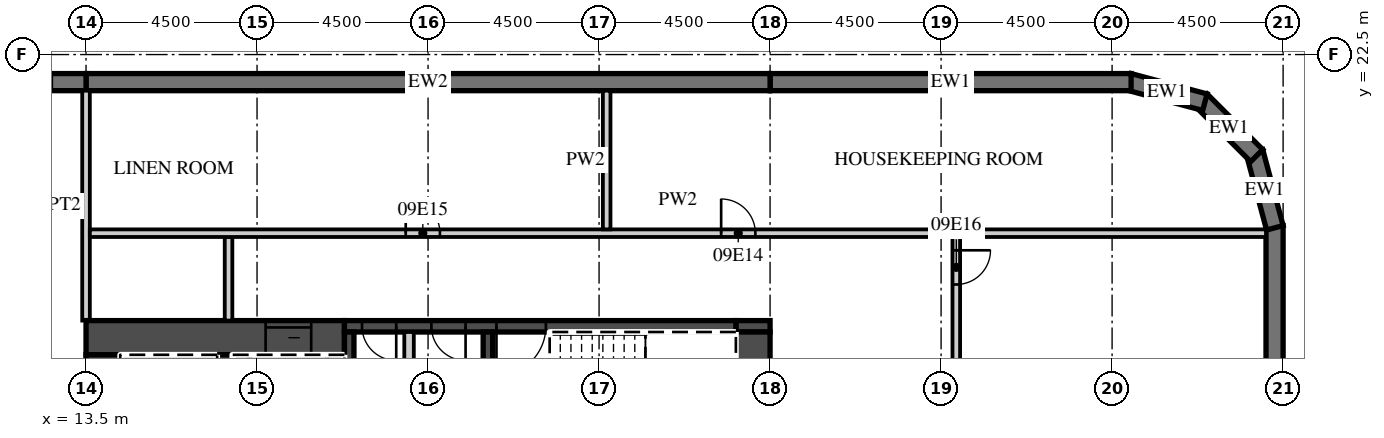
"""IFC4 building model, lengths in metres.
Left out: names, types, materials, properties, quantities, classifications, styles, units other than length and angle.
Written with IfcOpenShell. Run it as: python <this file> out.ifc"""

import sys

from ifc_helpers import new_model, si_unit, direction, frame, frame_2d, origin, place, context, subcontext, project, spatial, polyline, rectangle, outline, extrude, element, fill, save


model = new_model("IFC4")
c1 = context("Model", 3, precision=1e-05, world=origin(), true_north=direction((0.0, 1.0)))
c2 = subcontext(c1, "Body", "Model", "MODEL_VIEW")
j1 = project(units=[si_unit("LENGTHUNIT", "METRE"), si_unit("PLANEANGLEUNIT", "RADIAN")], contexts=[c1])
p1 = place(None, origin())
s1 = spatial("IfcSite", under=j1, at=p1, CompositionType="ELEMENT")
p2 = place(p1, origin())
s2 = spatial("IfcBuilding", under=s1, at=p2, CompositionType="ELEMENT")
p3 = place(p2, frame((0.0, 0.0, 60.0)))
s3 = spatial("IfcBuildingStorey", under=s2, at=p3, CompositionType="ELEMENT", Elevation=60.0)
p4 = place(p3, frame((44.775, -18.0, 0.0), z_axis=(0.0, 0.0, 1.0), x_axis=(0.0, 1.0, 0.0)))
e1 = element("IfcWall", 1, at=p4, inside=s3, PredefinedType="SOLIDWALL", context=c2, shape_type="SweptSolid", body=[
    extrude(rectangle(XDim=36.0, YDim=0.45, at=frame_2d((18.0, 0.0))), origin(), (0.0, 0.0, 1.0), 3.02),
])
p5 = place(p4, frame((3.9, 0.0, 0.45)))
e2 = element("IfcOpeningElement", 2, at=p5, cuts=e1, PredefinedType="OPENING", context=c2, shape_type="SweptSolid", body=[
    extrude(rectangle(XDim=3.3, YDim=2.25, at=frame_2d((1.65, 1.125))), frame((0.0, 0.235, 0.0), z_axis=(0.0, -1.0, 0.0), x_axis=(1.0, 0.0, 0.0)), (0.0, 0.0, 1.0), 0.47),
])
p6 = place(p4, frame((8.4, 0.0, 0.45)))
e3 = element("IfcOpeningElement", 3, at=p6, cuts=e1, PredefinedType="OPENING", context=c2, shape_type="SweptSolid", body=[
    extrude(rectangle(XDim=3.3, YDim=2.25, at=frame_2d((1.65, 1.125))), frame((0.0, 0.235, 0.0), z_axis=(0.0, -1.0, 0.0), x_axis=(1.0, 0.0, 0.0)), (0.0, 0.0, 1.0), 0.47),
])
p7 = place(p4, frame((12.9, 0.0, 0.45)))
e4 = element("IfcOpeningElement", 4, at=p7, cuts=e1, PredefinedType="OPENING", context=c2, shape_type="SweptSolid", body=[
    extrude(rectangle(XDim=3.3, YDim=2.25, at=frame_2d((1.65, 1.125))), frame((0.0, 0.235, 0.0), z_axis=(0.0, -1.0, 0.0), x_axis=(1.0, 0.0, 0.0)), (0.0, 0.0, 1.0), 0.47),
])
p8 = place(p3, frame((44.783, 17.942, 0.0), z_axis=(0.0, 0.0, 1.0), x_axis=(-0.25881466832, 0.965926999034, 0.0)))
e5 = element("IfcWall", 5, at=p8, inside=s3, PredefinedType="SOLIDWALL", context=c2, shape_type="SweptSolid", body=[
    extrude(outline(polyline([(0.0, -0.225), (2.071, -0.225), (1.95, 0.225), (0.121, 0.225), (0.0, -0.225)])), origin(), (0.0, 0.0, 1.0), 3.02),
])
p9 = place(p3, frame((44.305, 19.841, 0.0), z_axis=(0.0, 0.0, 1.0), x_axis=(-0.707106781187, 0.707106781187, 0.0)))
e6 = element("IfcWall", 6, at=p9, inside=s3, PredefinedType="SOLIDWALL", context=c2, shape_type="SweptSolid", body=[
    extrude(outline(polyline([(0.0, -0.225), (2.071, -0.225), (1.95, 0.225), (0.121, 0.225), (0.0, -0.225)])), origin(), (0.0, 0.0, 1.0), 3.02),
])
p10 = place(p3, frame((42.942, 21.247, 0.0), z_axis=(0.0, 0.0, 1.0), x_axis=(-0.965926999034, 0.25881466832, 0.0)))
e7 = element("IfcWall", 7, at=p10, inside=s3, PredefinedType="SOLIDWALL", context=c2, shape_type="SweptSolid", body=[
    extrude(outline(polyline([(-0.0, -0.225), (2.07, -0.225), (1.95, 0.225), (0.12, 0.225), (-0.0, -0.225)])), origin(), (0.0, 0.0, 1.0), 3.02),
])
p11 = place(p3, frame((41.0, 21.775, 0.0), z_axis=(0.0, 0.0, 1.0), x_axis=(-1.0, 0.0, 0.0)))
e8 = element("IfcWall", 8, at=p11, inside=s3, PredefinedType="SOLIDWALL", context=c2, shape_type="SweptSolid", body=[
    extrude(rectangle(XDim=9.5, YDim=0.45, at=frame_2d((4.75, 0.0))), origin(), (0.0, 0.0, 1.0), 3.02),
])
p12 = place(p3, frame((31.5, 21.775, 0.0), z_axis=(0.0, 0.0, 1.0), x_axis=(-1.0, 0.0, 0.0)))
e9 = element("IfcWall", 9, at=p12, inside=s3, PredefinedType="SOLIDWALL", context=c2, shape_type="SweptSolid", body=[
    extrude(rectangle(XDim=18.0, YDim=0.45, at=frame_2d((9.0, 0.0))), origin(), (0.0, 0.0, 1.0), 3.02),
])
p13 = place(p3, frame((13.5, 21.775, 0.0), z_axis=(0.0, 0.0, 1.0), x_axis=(-1.0, 0.0, 0.0)))
e10 = element("IfcWall", 10, at=p13, inside=s3, PredefinedType="SOLIDWALL", context=c2, shape_type="SweptSolid", body=[
    extrude(rectangle(XDim=54.5, YDim=0.45, at=frame_2d((27.25, 0.0))), origin(), (0.0, 0.0, 1.0), 3.02),
])
p14 = place(p13, frame((0.9, 0.0, 0.45)))
e11 = element("IfcOpeningElement", 11, at=p14, cuts=e10, PredefinedType="OPENING", context=c2, shape_type="SweptSolid", body=[
    extrude(rectangle(XDim=2.7, YDim=2.25, at=frame_2d((1.35, 1.125))), frame((0.0, 0.235, 0.0), z_axis=(0.0, -1.0, 0.0), x_axis=(1.0, 0.0, 0.0)), (0.0, 0.0, 1.0), 0.47),
])
p15 = place(p13, frame((5.4, 0.0, 0.45)))
e12 = element("IfcOpeningElement", 12, at=p15, cuts=e10, PredefinedType="OPENING", context=c2, shape_type="SweptSolid", body=[
    extrude(rectangle(XDim=2.7, YDim=2.25, at=frame_2d((1.35, 1.125))), frame((0.0, 0.235, 0.0), z_axis=(0.0, -1.0, 0.0), x_axis=(1.0, 0.0, 0.0)), (0.0, 0.0, 1.0), 0.47),
])
p16 = place(p13, frame((9.9, 0.0, 0.45)))
e13 = element("IfcOpeningElement", 13, at=p16, cuts=e10, PredefinedType="OPENING", context=c2, shape_type="SweptSolid", body=[
    extrude(rectangle(XDim=2.7, YDim=2.25, at=frame_2d((1.35, 1.125))), frame((0.0, 0.235, 0.0), z_axis=(0.0, -1.0, 0.0), x_axis=(1.0, 0.0, 0.0)), (0.0, 0.0, 1.0), 0.47),
])
p17 = place(p13, frame((14.4, 0.0, 0.45)))
e14 = element("IfcOpeningElement", 14, at=p17, cuts=e10, PredefinedType="OPENING", context=c2, shape_type="SweptSolid", body=[
    extrude(rectangle(XDim=2.7, YDim=2.25, at=frame_2d((1.35, 1.125))), frame((0.0, 0.235, 0.0), z_axis=(0.0, -1.0, 0.0), x_axis=(1.0, 0.0, 0.0)), (0.0, 0.0, 1.0), 0.47),
])
p18 = place(p13, frame((18.9, 0.0, 0.45)))
e15 = element("IfcOpeningElement", 15, at=p18, cuts=e10, PredefinedType="OPENING", context=c2, shape_type="SweptSolid", body=[
    extrude(rectangle(XDim=2.7, YDim=2.25, at=frame_2d((1.35, 1.125))), frame((0.0, 0.235, 0.0), z_axis=(0.0, -1.0, 0.0), x_axis=(1.0, 0.0, 0.0)), (0.0, 0.0, 1.0), 0.47),
])
p19 = place(p13, frame((23.4, 0.0, 0.45)))
e16 = element("IfcOpeningElement", 16, at=p19, cuts=e10, PredefinedType="OPENING", context=c2, shape_type="SweptSolid", body=[
    extrude(rectangle(XDim=2.7, YDim=2.25, at=frame_2d((1.35, 1.125))), frame((0.0, 0.235, 0.0), z_axis=(0.0, -1.0, 0.0), x_axis=(1.0, 0.0, 0.0)), (0.0, 0.0, 1.0), 0.47),
])
p20 = place(p13, frame((27.9, 0.0, 0.45)))
e17 = element("IfcOpeningElement", 17, at=p20, cuts=e10, PredefinedType="OPENING", context=c2, shape_type="SweptSolid", body=[
    extrude(rectangle(XDim=2.7, YDim=2.25, at=frame_2d((1.35, 1.125))), frame((0.0, 0.235, 0.0), z_axis=(0.0, -1.0, 0.0), x_axis=(1.0, 0.0, 0.0)), (0.0, 0.0, 1.0), 0.47),
])
p21 = place(p13, frame((32.4, 0.0, 0.45)))
e18 = element("IfcOpeningElement", 18, at=p21, cuts=e10, PredefinedType="OPENING", context=c2, shape_type="SweptSolid", body=[
    extrude(rectangle(XDim=2.7, YDim=2.25, at=frame_2d((1.35, 1.125))), frame((0.0, 0.235, 0.0), z_axis=(0.0, -1.0, 0.0), x_axis=(1.0, 0.0, 0.0)), (0.0, 0.0, 1.0), 0.47),
])
p22 = place(p13, frame((36.9, 0.0, 0.45)))
e19 = element("IfcOpeningElement", 19, at=p22, cuts=e10, PredefinedType="OPENING", context=c2, shape_type="SweptSolid", body=[
    extrude(rectangle(XDim=2.7, YDim=2.25, at=frame_2d((1.35, 1.125))), frame((0.0, 0.235, 0.0), z_axis=(0.0, -1.0, 0.0), x_axis=(1.0, 0.0, 0.0)), (0.0, 0.0, 1.0), 0.47),
])
p23 = place(p13, frame((41.4, 0.0, 0.45)))
e20 = element("IfcOpeningElement", 20, at=p23, cuts=e10, PredefinedType="OPENING", context=c2, shape_type="SweptSolid", body=[
    extrude(rectangle(XDim=2.7, YDim=2.25, at=frame_2d((1.35, 1.125))), frame((0.0, 0.235, 0.0), z_axis=(0.0, -1.0, 0.0), x_axis=(1.0, 0.0, 0.0)), (0.0, 0.0, 1.0), 0.47),
])
p24 = place(p13, frame((45.9, 0.0, 0.45)))
e21 = element("IfcOpeningElement", 21, at=p24, cuts=e10, PredefinedType="OPENING", context=c2, shape_type="SweptSolid", body=[
    extrude(rectangle(XDim=2.7, YDim=2.25, at=frame_2d((1.35, 1.125))), frame((0.0, 0.235, 0.0), z_axis=(0.0, -1.0, 0.0), x_axis=(1.0, 0.0, 0.0)), (0.0, 0.0, 1.0), 0.47),
])
p25 = place(p13, frame((50.4, 0.0, 0.45)))
e22 = element("IfcOpeningElement", 22, at=p25, cuts=e10, PredefinedType="OPENING", context=c2, shape_type="SweptSolid", body=[
    extrude(rectangle(XDim=2.7, YDim=2.25, at=frame_2d((1.35, 1.125))), frame((0.0, 0.235, 0.0), z_axis=(0.0, -1.0, 0.0), x_axis=(1.0, 0.0, 0.0)), (0.0, 0.0, 1.0), 0.47),
])
p26 = place(p3, frame((13.5, 15.5, 0.0), z_axis=(0.0, 0.0, 1.0), x_axis=(0.0, 1.0, 0.0)))
e23 = element("IfcWall", 23, at=p26, inside=s3, PredefinedType="PARTITIONING", context=c2, shape_type="SweptSolid", body=[
    extrude(rectangle(XDim=6.05, YDim=0.2, at=frame_2d((3.025, 0.0))), origin(), (0.0, 0.0, 1.0), 3.02),
])
p27 = place(p3, frame((13.5, 15.05, 0.0), z_axis=(0.0, 0.0, 1.0), x_axis=(1.0, 0.0, 0.0)))
e24 = element("IfcWall", 24, at=p27, inside=s3, PredefinedType="SHEAR", context=c2, shape_type="SweptSolid", body=[
    extrude(rectangle(XDim=6.8, YDim=0.9, at=frame_2d((3.4, 0.0))), origin(), (0.0, 0.0, 1.0), 3.02),
])
p28 = place(p27, frame((4.725, 0.0, 0.0)))
e25 = element("IfcOpeningElement", 25, at=p28, cuts=e24, PredefinedType="OPENING", context=c2, shape_type="SweptSolid", body=[
    extrude(rectangle(XDim=1.2, YDim=2.1, at=frame_2d((0.6, 1.05))), frame((0.0, 0.46, 0.0), z_axis=(0.0, -1.0, 0.0), x_axis=(1.0, 0.0, 0.0)), (0.0, 0.0, 1.0), 0.92),
])
p29 = place(p3, frame((30.6, 15.35, 0.0), z_axis=(0.0, 0.0, 1.0), x_axis=(1.0, 0.0, 0.0)))
e26 = element("IfcWall", 26, at=p29, inside=s3, PredefinedType="SHEAR", context=c2, shape_type="SweptSolid", body=[
    extrude(rectangle(XDim=0.9, YDim=0.3, at=frame_2d((0.45, 0.0))), origin(), (0.0, 0.0, 1.0), 3.02),
])
p30 = place(p3, frame((20.3, 15.35, 0.0), z_axis=(0.0, 0.0, 1.0), x_axis=(1.0, 0.0, 0.0)))
e27 = element("IfcWall", 27, at=p30, inside=s3, PredefinedType="SHEAR", context=c2, shape_type="SweptSolid", body=[
    extrude(rectangle(XDim=10.3, YDim=0.3, at=frame_2d((5.15, 0.0))), origin(), (0.0, 0.0, 1.0), 3.02),
])
p31 = place(p30, frame((4.0, 0.0, 0.0)))
e28 = element("IfcOpeningElement", 28, at=p31, cuts=e27, PredefinedType="OPENING", context=c2, shape_type="SweptSolid", body=[
    extrude(rectangle(XDim=1.3, YDim=2.1, at=frame_2d((0.65, 1.05))), frame((0.0, 0.16, 0.0), z_axis=(0.0, -1.0, 0.0), x_axis=(1.0, 0.0, 0.0)), (0.0, 0.0, 1.0), 0.32),
])
p32 = place(p30, frame((2.288, 0.0, 0.0)))
e29 = element("IfcOpeningElement", 29, at=p32, cuts=e27, PredefinedType="OPENING", context=c2, shape_type="SweptSolid", body=[
    extrude(rectangle(XDim=0.9, YDim=2.1, at=frame_2d((0.45, 1.05))), frame((0.0, 0.16, 0.0), z_axis=(0.0, -1.0, 0.0), x_axis=(1.0, 0.0, 0.0)), (0.0, 0.0, 1.0), 0.32),
])
p33 = place(p30, frame((0.462, 0.0, 0.0)))
e30 = element("IfcOpeningElement", 30, at=p33, cuts=e27, PredefinedType="OPENING", context=c2, shape_type="SweptSolid", body=[
    extrude(rectangle(XDim=0.9, YDim=2.1, at=frame_2d((0.45, 1.05))), frame((0.0, 0.16, 0.0), z_axis=(0.0, -1.0, 0.0), x_axis=(1.0, 0.0, 0.0)), (0.0, 0.0, 1.0), 0.32),
])
p34 = place(p3, frame((31.05, 2.4, 0.0), z_axis=(0.0, 0.0, 1.0), x_axis=(0.0, 1.0, 0.0)))
e31 = element("IfcWall", 31, at=p34, inside=s3, PredefinedType="SHEAR", context=c2, shape_type="SweptSolid", body=[
    extrude(rectangle(XDim=12.8, YDim=0.9, at=frame_2d((6.4, 0.0))), origin(), (0.0, 0.0, 1.0), 3.02),
])
p35 = place(p34, frame((0.2, 0.0, 0.0)))
e32 = element("IfcOpeningElement", 32, at=p35, cuts=e31, PredefinedType="OPENING", context=c2, shape_type="SweptSolid", body=[
    extrude(rectangle(XDim=1.1, YDim=2.1, at=frame_2d((0.55, 1.05))), frame((0.0, 0.46, 0.0), z_axis=(0.0, -1.0, 0.0), x_axis=(1.0, 0.0, 0.0)), (0.0, 0.0, 1.0), 0.92),
])
p36 = place(p3, frame((13.95, 2.4, 0.0), z_axis=(0.0, 0.0, 1.0), x_axis=(0.0, 1.0, 0.0)))
e33 = element("IfcWall", 33, at=p36, inside=s3, PredefinedType="SHEAR", context=c2, shape_type="SweptSolid", body=[
    extrude(rectangle(XDim=12.2, YDim=0.9, at=frame_2d((6.1, 0.0))), origin(), (0.0, 0.0, 1.0), 3.02),
])
p37 = place(p3, frame((17.15, 8.8, 0.0), z_axis=(0.0, 0.0, 1.0), x_axis=(0.0, 1.0, 0.0)))
e34 = element("IfcWall", 34, at=p37, inside=s3, PredefinedType="SHEAR", context=c2, shape_type="SweptSolid", body=[
    extrude(rectangle(XDim=5.8, YDim=0.4, at=frame_2d((2.9, 0.0))), origin(), (0.0, 0.0, 1.0), 3.02),
])
for number, where, z_axis, x_axis in (
    (35, (20.425, 11.95, 0.0), (0.0, 0.0, 1.0), (0.0, 1.0, 0.0)),
    (36, (24.075, 11.95, 0.0), (0.0, 0.0, 1.0), (0.0, 1.0, 0.0)),
):
    element("IfcWall", number, at=place(p3, frame(where, z_axis=z_axis, x_axis=x_axis)), inside=s3, PredefinedType="SHEAR", context=c2, shape_type="SweptSolid", body=[
        extrude(rectangle(XDim=3.25, YDim=0.25, at=frame_2d((1.625, 0.0))), origin(), (0.0, 0.0, 1.0), 3.02),
    ])
p38 = place(p3, frame((22.0, 11.95, 0.0), z_axis=(0.0, 0.0, 1.0), x_axis=(0.0, 1.0, 0.0)))
e37 = element("IfcWall", 37, at=p38, inside=s3, PredefinedType="PARTITIONING", context=c2, shape_type="SweptSolid", body=[
    extrude(rectangle(XDim=3.25, YDim=0.25, at=frame_2d((1.625, 0.0))), origin(), (0.0, 0.0, 1.0), 3.02),
])
p39 = place(p3, frame((17.25, 15.5, 0.0), z_axis=(0.0, 0.0, 1.0), x_axis=(0.0, 1.0, 0.0)))
e38 = element("IfcWall", 38, at=p39, inside=s3, PredefinedType="PARTITIONING", context=c2, shape_type="SweptSolid", body=[
    extrude(rectangle(XDim=2.2, YDim=0.2, at=frame_2d((1.1, 0.0))), origin(), (0.0, 0.0, 1.0), 3.02),
])
p40 = place(p3, frame((36.4, 1.75, 0.0), z_axis=(0.0, 0.0, 1.0), x_axis=(0.0, 1.0, 0.0)))
e39 = element("IfcWall", 39, at=p40, inside=s3, PredefinedType="PARTITIONING", context=c2, shape_type="SweptSolid", body=[
    extrude(rectangle(XDim=15.95, YDim=0.2, at=frame_2d((7.975, 0.0))), origin(), (0.0, 0.0, 1.0), 3.02),
])
p41 = place(p40, frame((14.7, 0.0, 0.0)))
e40 = element("IfcOpeningElement", 40, at=p41, cuts=e39, PredefinedType="OPENING", context=c2, shape_type="SweptSolid", body=[
    extrude(rectangle(XDim=0.9, YDim=2.1, at=frame_2d((0.45, 1.05))), frame((0.0, 0.11, 0.0), z_axis=(0.0, -1.0, 0.0), x_axis=(1.0, 0.0, 0.0)), (0.0, 0.0, 1.0), 0.22),
])
p42 = place(p3, frame((13.6, 17.8, 0.0), z_axis=(0.0, 0.0, 1.0), x_axis=(1.0, 0.0, 0.0)))
e41 = element("IfcWall", 41, at=p42, inside=s3, PredefinedType="PARTITIONING", context=c2, shape_type="SweptSolid", body=[
    extrude(rectangle(XDim=30.95, YDim=0.2, at=frame_2d((15.475, 0.0))), origin(), (0.0, 0.0, 1.0), 3.02),
])
p43 = place(p42, frame((16.613, 0.0, 0.0)))
e42 = element("IfcOpeningElement", 42, at=p43, cuts=e41, PredefinedType="OPENING", context=c2, shape_type="SweptSolid", body=[
    extrude(rectangle(XDim=0.9, YDim=2.1, at=frame_2d((0.45, 1.05))), frame((0.0, 0.11, 0.0), z_axis=(0.0, -1.0, 0.0), x_axis=(1.0, 0.0, 0.0)), (0.0, 0.0, 1.0), 0.22),
])
p44 = place(p42, frame((8.312, 0.0, 0.0)))
e43 = element("IfcOpeningElement", 43, at=p44, cuts=e41, PredefinedType="OPENING", context=c2, shape_type="SweptSolid", body=[
    extrude(rectangle(XDim=0.9, YDim=2.1, at=frame_2d((0.45, 1.05))), frame((0.0, 0.11, 0.0), z_axis=(0.0, -1.0, 0.0), x_axis=(1.0, 0.0, 0.0)), (0.0, 0.0, 1.0), 0.22),
])
p45 = place(p3, frame((27.2, 17.9, 0.0), z_axis=(0.0, 0.0, 1.0), x_axis=(0.0, 1.0, 0.0)))
e44 = element("IfcWall", 44, at=p45, inside=s3, PredefinedType="PARTITIONING", context=c2, shape_type="SweptSolid", body=[
    extrude(rectangle(XDim=3.65, YDim=0.2, at=frame_2d((1.825, 0.0))), origin(), (0.0, 0.0, 1.0), 3.02),
])
p46 = place(p28, origin())
e45 = element("IfcDoor", 45, at=p46, inside=s3, OperationType="SLIDING_TO_LEFT", PredefinedType="DOOR", context=c2, shape_type="SweptSolid", body=[
    extrude(rectangle(XDim=1.2, YDim=2.1, at=frame_2d((0.6, 1.05))), frame((0.0, 0.025, 0.0), z_axis=(0.0, -1.0, 0.0), x_axis=(1.0, 0.0, 0.0)), (0.0, 0.0, 1.0), 0.05),
])
fill(e25, e45)
p47 = place(p31, origin())
e46 = element("IfcDoor", 46, at=p47, inside=s3, OperationType="SINGLE_SWING_LEFT", PredefinedType="DOOR", context=c2, shape_type="SweptSolid", body=[
    extrude(rectangle(XDim=1.3, YDim=2.1, at=frame_2d((0.65, 1.05))), frame((0.0, 0.025, 0.0), z_axis=(0.0, -1.0, 0.0), x_axis=(1.0, 0.0, 0.0)), (0.0, 0.0, 1.0), 0.05),
])
fill(e28, e46)
p48 = place(p32, origin())
e47 = element("IfcDoor", 47, at=p48, inside=s3, OperationType="SINGLE_SWING_RIGHT", PredefinedType="DOOR", context=c2, shape_type="SweptSolid", body=[
    extrude(rectangle(XDim=0.9, YDim=2.1, at=frame_2d((0.45, 1.05))), frame((0.0, 0.025, 0.0), z_axis=(0.0, -1.0, 0.0), x_axis=(1.0, 0.0, 0.0)), (0.0, 0.0, 1.0), 0.05),
])
fill(e29, e47)
p49 = place(p33, origin())
e48 = element("IfcDoor", 48, at=p49, inside=s3, OperationType="SINGLE_SWING_RIGHT", PredefinedType="DOOR", context=c2, shape_type="SweptSolid", body=[
    extrude(rectangle(XDim=0.9, YDim=2.1, at=frame_2d((0.45, 1.05))), frame((0.0, 0.025, 0.0), z_axis=(0.0, -1.0, 0.0), x_axis=(1.0, 0.0, 0.0)), (0.0, 0.0, 1.0), 0.05),
])
fill(e30, e48)
p50 = place(p43, origin())
e49 = element("IfcDoor", 49, at=p50, inside=s3, OperationType="SINGLE_SWING_LEFT", PredefinedType="DOOR", context=c2, shape_type="SweptSolid", body=[
    extrude(rectangle(XDim=0.9, YDim=2.1, at=frame_2d((0.45, 1.05))), frame((0.0, 0.025, 0.0), z_axis=(0.0, -1.0, 0.0), x_axis=(1.0, 0.0, 0.0)), (0.0, 0.0, 1.0), 0.05),
])
fill(e42, e49)
p51 = place(p44, origin())
e50 = element("IfcDoor", 50, at=p51, inside=s3, OperationType="SINGLE_SWING_LEFT", PredefinedType="DOOR", context=c2, shape_type="SweptSolid", body=[
    extrude(rectangle(XDim=0.9, YDim=2.1, at=frame_2d((0.45, 1.05))), frame((0.0, 0.025, 0.0), z_axis=(0.0, -1.0, 0.0), x_axis=(1.0, 0.0, 0.0)), (0.0, 0.0, 1.0), 0.05),
])
fill(e43, e50)
p52 = place(p41, origin())
e51 = element("IfcDoor", 51, at=p52, inside=s3, OperationType="SINGLE_SWING_RIGHT", PredefinedType="DOOR", context=c2, shape_type="SweptSolid", body=[
    extrude(rectangle(XDim=0.9, YDim=2.1, at=frame_2d((0.45, 1.05))), frame((0.0, 0.025, 0.0), z_axis=(0.0, -1.0, 0.0), x_axis=(1.0, 0.0, 0.0)), (0.0, 0.0, 1.0), 0.05),
])
fill(e40, e51)
save(model, sys.argv[1])
